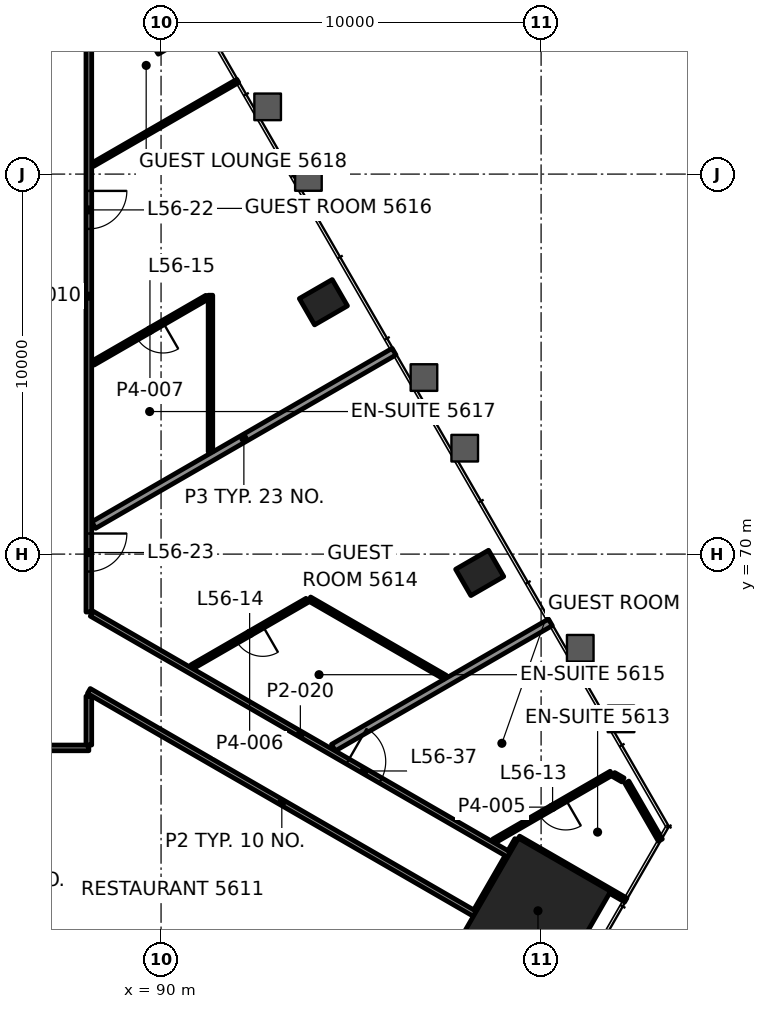
"""IFC4 building model, lengths in metres.
Left out: names, types, materials, properties, quantities, classifications, styles, units other than length and angle.
Written with IfcOpenShell. Run it as: python <this file> out.ifc"""

import sys

from ifc_helpers import new_model, si_unit, direction, frame, frame_2d, origin, origin_2d, place, context, subcontext, project, spatial, rectangle, hollow_rectangle, extrude, element, fill, save


model = new_model("IFC4")
c1 = context("Model", 3, precision=1e-05, world=origin(), true_north=direction((0.0, 1.0)))
c2 = subcontext(c1, "Body", "Model", "MODEL_VIEW")
j1 = project(units=[si_unit("LENGTHUNIT", "METRE"), si_unit("PLANEANGLEUNIT", "RADIAN")], contexts=[c1])
p1 = place(None, origin())
s1 = spatial("IfcSite", under=j1, at=p1, CompositionType="ELEMENT")
p2 = place(p1, origin())
s2 = spatial("IfcBuilding", under=s1, at=p2, CompositionType="ELEMENT")
p3 = place(p2, frame((0.0, 0.0, 237.7)))
s3 = spatial("IfcBuildingStorey", under=s2, at=p3, CompositionType="ELEMENT", Elevation=237.7)
p4 = place(p3, frame((99.918, 60.614, 0.0), z_axis=(0.0, 0.0, 1.0), x_axis=(0.5, 0.866025403784, 0.0)))
e1 = element("IfcColumn", 1, at=p4, inside=s3, PredefinedType="COLUMN", context=c2, shape_type="SweptSolid", body=[
    extrude(rectangle(XDim=2.8, YDim=2.8, at=origin_2d()), origin(), (0.0, 0.0, 1.0), 3.9),
])
for number, where, z_axis, x_axis in (
    (2, (98.385, 69.505, -0.0), (0.0, 0.0, 1.0), (-0.5, 0.866, 0.0)),
    (3, (94.272, 76.628, -0.0), (0.0, 0.0, 1.0), (-0.5, 0.866, 0.0)),
    (4, (90.159, 83.752, -0.0), (0.0, 0.0, 1.0), (-0.5, 0.866, 0.0)),
):
    element("IfcColumn", number, at=place(p3, frame(where, z_axis=z_axis, x_axis=x_axis)), inside=s3, PredefinedType="COLUMN", context=c2, shape_type="SweptSolid", body=[
        extrude(hollow_rectangle(XDim=0.8, YDim=1.0, WallThickness=0.05, at=origin_2d()), origin(), (0.0, 0.0, 1.0), 3.9),
    ])
p5 = place(p3, frame((88.099, 64.9, 0.0), z_axis=(0.0, 0.0, 1.0), x_axis=(-1.0, 0.0, 0.0)))
e5 = element("IfcWall", 5, at=p5, inside=s3, PredefinedType="PARTITIONING", context=c2, shape_type="SweptSolid", body=[
    extrude(rectangle(XDim=26.199, YDim=0.15, at=frame_2d((13.1, 0.0))), origin(), (0.0, 0.0, 1.0), 3.0),
])
p6 = place(p5, frame((2.088, 0.0, 0.0)))
e6 = element("IfcOpeningElement", 6, at=p6, cuts=e5, PredefinedType="OPENING", context=c2, shape_type="SweptSolid", body=[
    extrude(rectangle(XDim=0.9, YDim=2.1, at=frame_2d((0.45, 1.05))), frame((0.0, 0.085, 0.0), z_axis=(0.0, -1.0, 0.0), x_axis=(1.0, 0.0, 0.0)), (0.0, 0.0, 1.0), 0.17),
])
p7 = place(p5, frame((5.4, 0.0, 0.0)))
e7 = element("IfcOpeningElement", 7, at=p7, cuts=e5, PredefinedType="OPENING", context=c2, shape_type="SweptSolid", body=[
    extrude(rectangle(XDim=1.0, YDim=2.1, at=frame_2d((0.5, 1.05))), frame((0.0, 0.085, 0.0), z_axis=(0.0, -1.0, 0.0), x_axis=(1.0, 0.0, 0.0)), (0.0, 0.0, 1.0), 0.17),
])
p8 = place(p5, frame((17.946, 0.0, 0.0)))
e8 = element("IfcOpeningElement", 8, at=p8, cuts=e5, PredefinedType="OPENING", context=c2, shape_type="SweptSolid", body=[
    extrude(rectangle(XDim=1.0, YDim=2.1, at=frame_2d((0.5, 1.05))), frame((0.0, 0.085, 0.0), z_axis=(0.0, -1.0, 0.0), x_axis=(1.0, 0.0, 0.0)), (0.0, 0.0, 1.0), 0.17),
])
p9 = place(p5, frame((24.395, 0.0, 0.0)))
e9 = element("IfcOpeningElement", 9, at=p9, cuts=e5, PredefinedType="OPENING", context=c2, shape_type="SweptSolid", body=[
    extrude(rectangle(XDim=1.0, YDim=2.1, at=frame_2d((0.5, 1.05))), frame((0.0, 0.085, 0.0), z_axis=(0.0, -1.0, 0.0), x_axis=(1.0, 0.0, 0.0)), (0.0, 0.0, 1.0), 0.17),
])
p10 = place(p3, frame((101.848, 64.234, 0.0), z_axis=(0.0, 0.0, 1.0), x_axis=(-0.865998731726, -0.500046194516, 0.0)))
e10 = element("IfcWall", 10, at=p10, inside=s3, PredefinedType="PARTITIONING", context=c2, shape_type="SweptSolid", body=[
    extrude(rectangle(XDim=3.569, YDim=0.12, at=frame_2d((1.784, 0.0))), origin(), (0.0, 0.0, 1.0), 3.0),
])
p11 = place(p10, frame((1.384, 0.0, 0.0)))
e11 = element("IfcOpeningElement", 11, at=p11, cuts=e10, PredefinedType="OPENING", context=c2, shape_type="SweptSolid", body=[
    extrude(rectangle(XDim=0.8, YDim=2.1, at=frame_2d((0.4, 1.05))), frame((0.0, 0.07, 0.0), z_axis=(0.0, -1.0, 0.0), x_axis=(1.0, 0.0, 0.0)), (0.0, 0.0, 1.0), 0.14),
])
p12 = place(p3, frame((94.535, 64.907, 0.0), z_axis=(0.0, 0.0, 1.0), x_axis=(0.866024015056, 0.50000240534, 0.0)))
e12 = element("IfcWall", 12, at=p12, inside=s3, PredefinedType="PARTITIONING", context=c2, shape_type="SweptSolid", body=[
    extrude(rectangle(XDim=6.593, YDim=0.2, at=frame_2d((3.296, 0.0))), origin(), (0.0, 0.0, 1.0), 3.0),
])
p13 = place(p3, frame((93.846, 68.784, 0.0), z_axis=(0.0, 0.0, 1.0), x_axis=(-0.865997352085, -0.500048583822, 0.0)))
e13 = element("IfcWall", 13, at=p13, inside=s3, PredefinedType="PARTITIONING", context=c2, shape_type="SweptSolid", body=[
    extrude(rectangle(XDim=3.499, YDim=0.12, at=frame_2d((1.75, 0.0))), origin(), (0.0, 0.0, 1.0), 3.0),
])
p14 = place(p13, frame((1.35, 0.0, 0.0)))
e14 = element("IfcOpeningElement", 14, at=p14, cuts=e13, PredefinedType="OPENING", context=c2, shape_type="SweptSolid", body=[
    extrude(rectangle(XDim=0.8, YDim=2.1, at=frame_2d((0.4, 1.05))), frame((0.0, 0.07, 0.0), z_axis=(0.0, -1.0, 0.0), x_axis=(1.0, 0.0, 0.0)), (0.0, 0.0, 1.0), 0.14),
])
p15 = place(p3, frame((88.227, 70.764, 0.0), z_axis=(0.0, 0.0, 1.0), x_axis=(0.866028789565, 0.499994135611, 0.0)))
e15 = element("IfcWall", 15, at=p15, inside=s3, PredefinedType="PARTITIONING", context=c2, shape_type="SweptSolid", body=[
    extrude(rectangle(XDim=9.127, YDim=0.2, at=frame_2d((4.563, 0.0))), origin(), (0.0, 0.0, 1.0), 2.922),
])
p16 = place(p3, frame((91.206, 76.757, 0.0), z_axis=(0.0, 0.0, 1.0), x_axis=(-0.866028087245, -0.499995352082, 0.0)))
e16 = element("IfcWall", 16, at=p16, inside=s3, PredefinedType="PARTITIONING", context=c2, shape_type="SweptSolid", body=[
    extrude(rectangle(XDim=3.459, YDim=0.12, at=frame_2d((1.729, 0.0))), origin(), (0.0, 0.0, 1.0), 3.0),
])
p17 = place(p16, frame((1.33, 0.0, 0.0)))
e17 = element("IfcOpeningElement", 17, at=p17, cuts=e16, PredefinedType="OPENING", context=c2, shape_type="SweptSolid", body=[
    extrude(rectangle(XDim=0.8, YDim=2.1, at=frame_2d((0.4, 1.05))), frame((0.0, 0.07, 0.0), z_axis=(0.0, -1.0, 0.0), x_axis=(1.0, 0.0, 0.0)), (0.0, 0.0, 1.0), 0.14),
])
p18 = place(p3, frame((88.201, 80.248, 0.0), z_axis=(0.0, 0.0, 1.0), x_axis=(0.866050012359, 0.499957374277, 0.0)))
e18 = element("IfcWall", 18, at=p18, inside=s3, PredefinedType="PARTITIONING", context=c2, shape_type="SweptSolid", body=[
    extrude(rectangle(XDim=4.408, YDim=0.1, at=frame_2d((2.204, 0.0))), origin(), (0.0, 0.0, 1.0), 2.922),
])
p19 = place(p3, frame((98.293, 60.6, 0.0), z_axis=(0.0, 0.0, 1.0), x_axis=(0.499927431592, 0.866067297121, 0.0)))
e19 = element("IfcWall", 19, at=p19, inside=s3, PredefinedType="PARTITIONING", context=c2, shape_type="SweptSolid", body=[
    extrude(rectangle(XDim=1.65, YDim=0.15, at=frame_2d((0.825, 0.0))), origin(), (0.0, 0.0, 1.0), 2.847),
])
p20 = place(p3, frame((91.3, 72.694, 0.0), z_axis=(0.0, 0.0, 1.0), x_axis=(0.0, 1.0, 0.0)))
e20 = element("IfcWall", 20, at=p20, inside=s3, PredefinedType="PARTITIONING", context=c2, shape_type="SweptSolid", body=[
    extrude(rectangle(XDim=4.118, YDim=0.12, at=frame_2d((2.059, 0.0))), origin(), (0.0, 0.0, 1.0), 3.0),
])
p21 = place(p3, frame((88.1, 64.976, 0.0), z_axis=(0.0, 0.0, 1.0), x_axis=(0.0, 1.0, 0.0)))
e21 = element("IfcWall", 21, at=p21, inside=s3, PredefinedType="PARTITIONING", context=c2, shape_type="SweptSolid", body=[
    extrude(rectangle(XDim=1.285, YDim=0.15, at=frame_2d((0.643, 0.0))), origin(), (0.0, 0.0, 1.0), 2.847),
])
p22 = place(p3, frame((88.1, 85.1, 0.0), z_axis=(0.0, 0.0, 1.0), x_axis=(0.0, -1.0, 0.0)))
e22 = element("IfcWall", 22, at=p22, inside=s3, PredefinedType="PARTITIONING", context=c2, shape_type="SweptSolid", body=[
    extrude(rectangle(XDim=16.624, YDim=0.15, at=frame_2d((8.312, 0.0))), origin(), (0.0, 0.0, 1.0), 3.0),
])
p23 = place(p22, frame((5.542, 0.0, 0.0)))
e23 = element("IfcOpeningElement", 23, at=p23, cuts=e22, PredefinedType="OPENING", context=c2, shape_type="SweptSolid", body=[
    extrude(rectangle(XDim=1.0, YDim=2.1, at=frame_2d((0.5, 1.05))), frame((0.0, 0.085, 0.0), z_axis=(0.0, -1.0, 0.0), x_axis=(1.0, 0.0, 0.0)), (0.0, 0.0, 1.0), 0.17),
])
p24 = place(p22, frame((14.558, 0.0, 0.0)))
e24 = element("IfcOpeningElement", 24, at=p24, cuts=e22, PredefinedType="OPENING", context=c2, shape_type="SweptSolid", body=[
    extrude(rectangle(XDim=1.0, YDim=2.1, at=frame_2d((0.5, 1.05))), frame((0.0, 0.085, 0.0), z_axis=(0.0, -1.0, 0.0), x_axis=(1.0, 0.0, 0.0)), (0.0, 0.0, 1.0), 0.17),
])
p25 = place(p3, frame((103.138, 62.471, 0.0), z_axis=(0.0, 0.0, 1.0), x_axis=(-0.499998282143, 0.866026395587, 0.0)))
e25 = element("IfcWall", 25, at=p25, inside=s3, PredefinedType="PARTITIONING", context=c2, shape_type="SweptSolid", body=[
    extrude(rectangle(XDim=1.762, YDim=0.12, at=frame_2d((0.881, 0.0))), origin(), (0.0, 0.0, 1.0), 3.0),
])
p26 = place(p3, frame((102.153, 64.058, 0.0), z_axis=(0.0, 0.0, 1.0), x_axis=(-0.866113839764, 0.499846793097, 0.0)))
e26 = element("IfcWall", 26, at=p26, inside=s3, PredefinedType="PARTITIONING", context=c2, shape_type="SweptSolid", body=[
    extrude(rectangle(XDim=0.283, YDim=0.12, at=frame_2d((0.142, 0.0))), origin(), (0.0, 0.0, 1.0), 3.0),
])
p27 = place(p3, frame((97.473, 66.76, 0.0), z_axis=(0.0, 0.0, 1.0), x_axis=(-0.866027647951, 0.499996112969, 0.0)))
e27 = element("IfcWall", 27, at=p27, inside=s3, PredefinedType="PARTITIONING", context=c2, shape_type="SweptSolid", body=[
    extrude(rectangle(XDim=4.119, YDim=0.12, at=frame_2d((2.059, 0.0))), origin(), (0.0, 0.0, 1.0), 3.0),
])
p28 = place(p3, frame((102.229, 60.896, 0.0), z_axis=(0.0, 0.0, 1.0), x_axis=(-0.866054628924, 0.499949377157, 0.0)))
e28 = element("IfcWall", 28, at=p28, inside=s3, PredefinedType="PARTITIONING", context=c2, shape_type="SweptSolid", body=[
    extrude(rectangle(XDim=3.26, YDim=0.12, at=frame_2d((1.63, 0.0))), origin(), (0.0, 0.0, 1.0), 3.0),
])
p29 = place(p3, frame((88.175, 68.433, 0.0), z_axis=(0.0, 0.0, 1.0), x_axis=(0.866028141608, -0.499995257921, 0.0)))
e29 = element("IfcWall", 29, at=p29, inside=s3, PredefinedType="PARTITIONING", context=c2, shape_type="SweptSolid", body=[
    extrude(rectangle(XDim=12.679, YDim=0.15, at=frame_2d((6.339, 0.0))), origin(), (0.0, 0.0, 1.0), 3.0),
])
p30 = place(p29, frame((7.779, 0.0, 0.0)))
e30 = element("IfcOpeningElement", 30, at=p30, cuts=e29, PredefinedType="OPENING", context=c2, shape_type="SweptSolid", body=[
    extrude(rectangle(XDim=1.0, YDim=2.1, at=frame_2d((0.5, 1.05))), frame((0.0, 0.085, 0.0), z_axis=(0.0, -1.0, 0.0), x_axis=(1.0, 0.0, 0.0)), (0.0, 0.0, 1.0), 0.17),
])
p31 = place(p3, frame((98.255, 60.535, 0.0), z_axis=(0.0, 0.0, 1.0), x_axis=(-0.866028172479, 0.49999520445, 0.0)))
e31 = element("IfcWall", 31, at=p31, inside=s3, PredefinedType="PARTITIONING", context=c2, shape_type="SweptSolid", body=[
    extrude(rectangle(XDim=11.726, YDim=0.15, at=frame_2d((5.863, 0.0))), origin(), (0.0, 0.0, 1.0), 2.847),
])
p32 = place(p3, frame((99.192, 62.158, 0.0), z_axis=(0.0, 0.0, 1.0), x_axis=(0.500534336868, 0.865716684381, 0.0)))
e32 = element("IfcWall", 32, at=p32, inside=s3, PredefinedType="PARTITIONING", context=c2, shape_type="SweptSolid", body=[
    extrude(rectangle(XDim=0.364, YDim=0.15, at=frame_2d((0.182, 0.0))), origin(), (0.0, 0.0, 1.0), 3.0),
])
p33 = place(p11, origin())
e33 = element("IfcDoor", 33, at=p33, inside=s3, OperationType="SINGLE_SWING_LEFT", PredefinedType="DOOR", context=c2, shape_type="SweptSolid", body=[
    extrude(rectangle(XDim=0.8, YDim=2.1, at=frame_2d((0.4, 1.05))), frame((0.0, 0.025, 0.0), z_axis=(0.0, -1.0, 0.0), x_axis=(1.0, 0.0, 0.0)), (0.0, 0.0, 1.0), 0.05),
])
fill(e11, e33)
p34 = place(p14, origin())
e34 = element("IfcDoor", 34, at=p34, inside=s3, OperationType="SINGLE_SWING_LEFT", PredefinedType="DOOR", context=c2, shape_type="SweptSolid", body=[
    extrude(rectangle(XDim=0.8, YDim=2.1, at=frame_2d((0.4, 1.05))), frame((0.0, 0.025, 0.0), z_axis=(0.0, -1.0, 0.0), x_axis=(1.0, 0.0, 0.0)), (0.0, 0.0, 1.0), 0.05),
])
fill(e14, e34)
p35 = place(p17, origin())
e35 = element("IfcDoor", 35, at=p35, inside=s3, OperationType="SINGLE_SWING_LEFT", PredefinedType="DOOR", context=c2, shape_type="SweptSolid", body=[
    extrude(rectangle(XDim=0.8, YDim=2.1, at=frame_2d((0.4, 1.05))), frame((0.0, 0.025, 0.0), z_axis=(0.0, -1.0, 0.0), x_axis=(1.0, 0.0, 0.0)), (0.0, 0.0, 1.0), 0.05),
])
fill(e17, e35)
p36 = place(p23, origin())
e36 = element("IfcDoor", 36, at=p36, inside=s3, OperationType="SINGLE_SWING_RIGHT", PredefinedType="DOOR", context=c2, shape_type="SweptSolid", body=[
    extrude(rectangle(XDim=1.0, YDim=2.1, at=frame_2d((0.5, 1.05))), frame((0.0, 0.025, 0.0), z_axis=(0.0, -1.0, 0.0), x_axis=(1.0, 0.0, 0.0)), (0.0, 0.0, 1.0), 0.05),
])
fill(e23, e36)
p37 = place(p24, origin())
e37 = element("IfcDoor", 37, at=p37, inside=s3, OperationType="SINGLE_SWING_RIGHT", PredefinedType="DOOR", context=c2, shape_type="SweptSolid", body=[
    extrude(rectangle(XDim=1.0, YDim=2.1, at=frame_2d((0.5, 1.05))), frame((0.0, 0.025, 0.0), z_axis=(0.0, -1.0, 0.0), x_axis=(1.0, 0.0, 0.0)), (0.0, 0.0, 1.0), 0.05),
])
fill(e24, e37)
p38 = place(p30, origin())
e38 = element("IfcDoor", 38, at=p38, inside=s3, OperationType="SINGLE_SWING_RIGHT", PredefinedType="DOOR", context=c2, shape_type="SweptSolid", body=[
    extrude(rectangle(XDim=1.0, YDim=2.1, at=frame_2d((0.5, 1.05))), frame((0.0, 0.025, 0.0), z_axis=(0.0, -1.0, 0.0), x_axis=(1.0, 0.0, 0.0)), (0.0, 0.0, 1.0), 0.05),
])
fill(e30, e38)
save(model, sys.argv[1])
